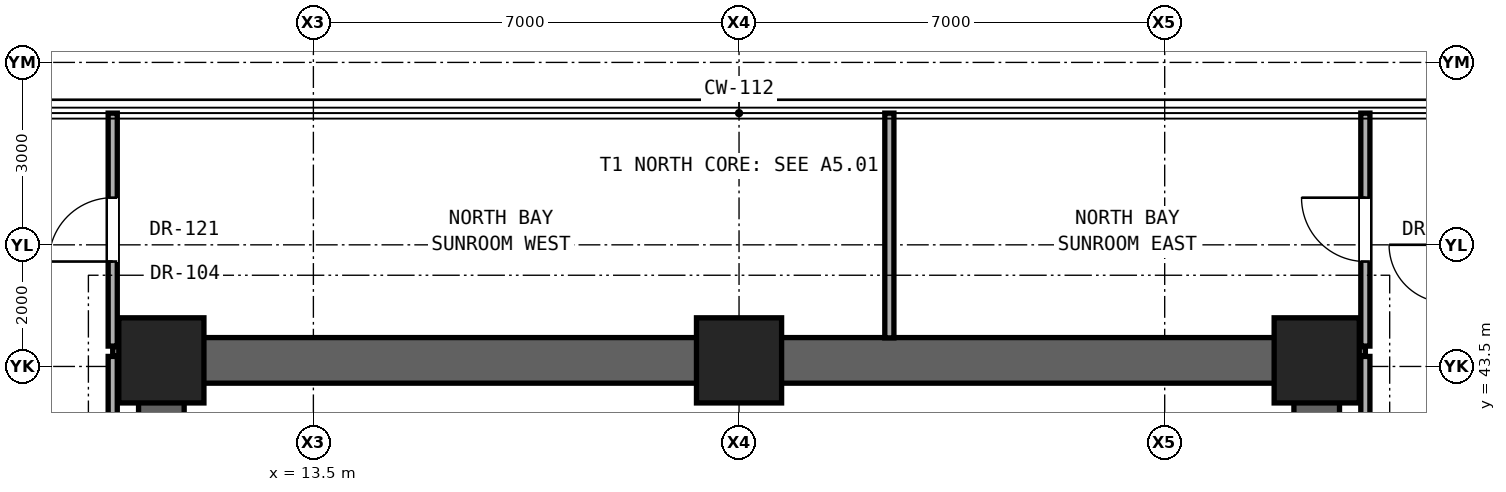
"""IFC4 building model, lengths in metres.
Left out: names, types, materials, properties, quantities, classifications, styles, units other than length and angle.
Written with IfcOpenShell. Run it as: python <this file> out.ifc"""

import sys

from ifc_helpers import new_model, si_unit, direction, frame, frame_2d, origin, origin_2d, place, context, subcontext, project, spatial, rectangle, extrude, element, fill, save


model = new_model("IFC4")
c1 = context("Model", 3, precision=1e-05, world=origin(), true_north=direction((0.0, 1.0)))
c2 = subcontext(c1, "Body", "Model", "MODEL_VIEW")
j1 = project(units=[si_unit("LENGTHUNIT", "METRE"), si_unit("PLANEANGLEUNIT", "RADIAN")], contexts=[c1])
p1 = place(None, origin())
s1 = spatial("IfcSite", under=j1, at=p1, CompositionType="ELEMENT")
p2 = place(p1, origin())
s2 = spatial("IfcBuilding", under=s1, at=p2, CompositionType="ELEMENT")
p3 = place(p2, frame((0.0, 0.0, 45.5)))
s3 = spatial("IfcBuildingStorey", under=s2, at=p3, CompositionType="ELEMENT", Elevation=45.5)
for number, where, z_axis, x_axis in (
    (1, (11.0, 43.6, 0.0), (0.0, 0.0, 1.0), (1.0, 0.0, 0.0)),
    (2, (20.5, 43.6, 0.0), (0.0, 0.0, 1.0), (1.0, 0.0, 0.0)),
    (3, (30.0, 43.6, 0.0), (0.0, 0.0, 1.0), (1.0, 0.0, 0.0)),
):
    element("IfcColumn", number, at=place(p3, frame(where, z_axis=z_axis, x_axis=x_axis)), inside=s3, PredefinedType="COLUMN", context=c2, shape_type="SweptSolid", body=[
        extrude(rectangle(XDim=1.4, YDim=1.4, at=origin_2d()), origin(), (0.0, 0.0, 1.0), 3.3),
    ])
p4 = place(p3, frame((11.0, 43.6, 0.0), z_axis=(0.0, 0.0, 1.0), x_axis=(1.0, 0.0, 0.0)))
e4 = element("IfcWall", 4, at=p4, inside=s3, PredefinedType="SHEAR", context=c2, shape_type="SweptSolid", body=[
    extrude(rectangle(XDim=19.0, YDim=0.75, at=frame_2d((9.5, 0.0))), origin(), (0.0, 0.0, 1.0), 3.06),
])
for number, where, z_axis, x_axis in (
    (5, (11.0, 37.6, 0.0), (0.0, 0.0, 1.0), (0.0, 1.0, 0.0)),
    (6, (30.0, 37.6, 0.0), (0.0, 0.0, 1.0), (0.0, 1.0, 0.0)),
):
    element("IfcWall", number, at=place(p3, frame(where, z_axis=z_axis, x_axis=x_axis)), inside=s3, PredefinedType="SHEAR", context=c2, shape_type="SweptSolid", body=[
        extrude(rectangle(XDim=6.0, YDim=0.75, at=frame_2d((3.0, 0.0))), origin(), (0.0, 0.0, 1.0), 3.06),
    ])
for number, where, z_axis, x_axis in (
    (7, (10.2, 43.75, 0.0), (0.0, 0.0, 1.0), (1.0, 0.0, 0.0)),
    (8, (30.37, 43.75, 0.0), (0.0, 0.0, 1.0), (1.0, 0.0, 0.0)),
):
    element("IfcWall", number, at=place(p3, frame(where, z_axis=z_axis, x_axis=x_axis)), inside=s3, PredefinedType="PARTITIONING", context=c2, shape_type="SweptSolid", body=[
        extrude(rectangle(XDim=0.43, YDim=0.15, at=frame_2d((0.215, 0.0))), origin(), (0.0, 0.0, 1.0), 3.06),
    ])
p5 = place(p3, frame((10.2, 34.535, 0.0), z_axis=(0.0, 0.0, 1.0), x_axis=(0.0, 1.0, 0.0)))
e9 = element("IfcWall", 9, at=p5, inside=s3, PredefinedType="PARTITIONING", context=c2, shape_type="SweptSolid", body=[
    extrude(rectangle(XDim=9.13, YDim=0.15, at=frame_2d((4.565, 0.0))), origin(), (0.0, 0.0, 1.0), 2.436),
])
p6 = place(p3, frame((10.2, 43.835, 0.0), z_axis=(0.0, 0.0, 1.0), x_axis=(0.0, 1.0, 0.0)))
e10 = element("IfcWall", 10, at=p6, inside=s3, PredefinedType="PARTITIONING", context=c2, shape_type="SweptSolid", body=[
    extrude(rectangle(XDim=3.831, YDim=0.15, at=frame_2d((1.916, 0.0))), origin(), (0.0, 0.0, 1.0), 3.06),
])
p7 = place(p6, frame((1.39, 0.0, 0.0)))
e11 = element("IfcOpeningElement", 11, at=p7, cuts=e10, PredefinedType="OPENING", context=c2, shape_type="SweptSolid", body=[
    extrude(rectangle(XDim=1.05, YDim=2.2, at=frame_2d((0.525, 1.1))), frame((0.0, 0.085, 0.0), z_axis=(0.0, -1.0, 0.0), x_axis=(1.0, 0.0, 0.0)), (0.0, 0.0, 1.0), 0.17),
])
p8 = place(p3, frame((22.972, 43.97, 0.0), z_axis=(0.0, 0.0, 1.0), x_axis=(0.0, 1.0, 0.0)))
e12 = element("IfcWall", 12, at=p8, inside=s3, PredefinedType="PARTITIONING", context=c2, shape_type="SweptSolid", body=[
    extrude(rectangle(XDim=3.696, YDim=0.15, at=frame_2d((1.848, 0.0))), origin(), (0.0, 0.0, 1.0), 3.06),
])
p9 = place(p3, frame((30.8, 34.57, 0.0), z_axis=(0.0, 0.0, 1.0), x_axis=(0.0, 1.0, 0.0)))
e13 = element("IfcWall", 13, at=p9, inside=s3, PredefinedType="PARTITIONING", context=c2, shape_type="SweptSolid", body=[
    extrude(rectangle(XDim=9.095, YDim=0.15, at=frame_2d((4.547, 0.0))), origin(), (0.0, 0.0, 1.0), 2.436),
])
p10 = place(p3, frame((30.8, 43.835, 0.0), z_axis=(0.0, 0.0, 1.0), x_axis=(0.0, 1.0, 0.0)))
e14 = element("IfcWall", 14, at=p10, inside=s3, PredefinedType="PARTITIONING", context=c2, shape_type="SweptSolid", body=[
    extrude(rectangle(XDim=3.831, YDim=0.15, at=frame_2d((1.916, 0.0))), origin(), (0.0, 0.0, 1.0), 3.06),
])
p11 = place(p10, frame((1.39, 0.0, 0.0)))
e15 = element("IfcOpeningElement", 15, at=p11, cuts=e14, PredefinedType="OPENING", context=c2, shape_type="SweptSolid", body=[
    extrude(rectangle(XDim=1.05, YDim=2.2, at=frame_2d((0.525, 1.1))), frame((0.0, 0.085, 0.0), z_axis=(0.0, -1.0, 0.0), x_axis=(1.0, 0.0, 0.0)), (0.0, 0.0, 1.0), 0.17),
])
p12 = place(p7, origin())
e16 = element("IfcDoor", 16, at=p12, inside=s3, OperationType="SINGLE_SWING_LEFT", PredefinedType="DOOR", context=c2, shape_type="SweptSolid", body=[
    extrude(rectangle(XDim=1.05, YDim=2.2, at=frame_2d((0.525, 1.1))), frame((0.0, 0.025, 0.0), z_axis=(0.0, -1.0, 0.0), x_axis=(1.0, 0.0, 0.0)), (0.0, 0.0, 1.0), 0.05),
])
fill(e11, e16)
p13 = place(p11, origin())
e17 = element("IfcDoor", 17, at=p13, inside=s3, OperationType="SINGLE_SWING_RIGHT", PredefinedType="DOOR", context=c2, shape_type="SweptSolid", body=[
    extrude(rectangle(XDim=1.05, YDim=2.2, at=frame_2d((0.525, 1.1))), frame((0.0, 0.025, 0.0), z_axis=(0.0, -1.0, 0.0), x_axis=(1.0, 0.0, 0.0)), (0.0, 0.0, 1.0), 0.05),
])
fill(e15, e17)
save(model, sys.argv[1])
